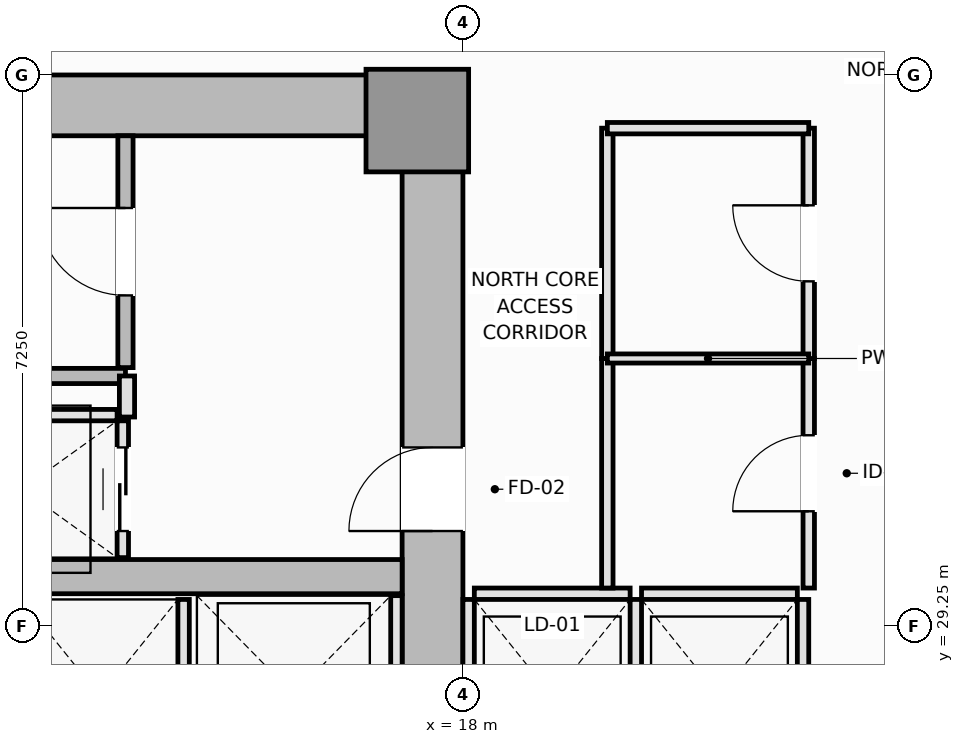
"""IFC4 building model, lengths in metres.
Left out: names, types, materials, properties, quantities, classifications, styles, units other than length and angle.
Written with IfcOpenShell. Run it as: python <this file> out.ifc"""

import sys

from ifc_helpers import new_model, si_unit, direction, frame, frame_2d, origin, origin_2d, place, context, subcontext, project, spatial, rectangle, extrude, element, fill, save


model = new_model("IFC4")
c1 = context("Model", 3, precision=1e-05, world=origin(), true_north=direction((0.0, 1.0)))
c2 = subcontext(c1, "Body", "Model", "MODEL_VIEW")
j1 = project(units=[si_unit("LENGTHUNIT", "METRE"), si_unit("PLANEANGLEUNIT", "RADIAN")], contexts=[c1])
p1 = place(None, origin())
s1 = spatial("IfcSite", under=j1, at=p1, CompositionType="ELEMENT")
p2 = place(p1, origin())
s2 = spatial("IfcBuilding", under=s1, at=p2, CompositionType="ELEMENT")
p3 = place(p2, frame((0.0, 0.0, 25.6)))
s3 = spatial("IfcBuildingStorey", under=s2, at=p3, CompositionType="ELEMENT", Elevation=25.6)
p4 = place(p3, frame((4.5, 36.1, 0.0), z_axis=(0.0, 0.0, 1.0), x_axis=(1.0, 0.0, 0.0)))
e1 = element("IfcWall", 1, at=p4, inside=s3, PredefinedType="SHEAR", context=c2, shape_type="SweptSolid", body=[
    extrude(rectangle(XDim=13.5, YDim=0.8, at=frame_2d((6.75, 0.0))), origin(), (0.0, 0.0, 1.0), 3.55),
])
p5 = place(p3, frame((17.6, 27.05, 0.0), z_axis=(0.0, 0.0, 1.0), x_axis=(0.0, 1.0, 0.0)))
e2 = element("IfcWall", 2, at=p5, inside=s3, PredefinedType="SHEAR", context=c2, shape_type="SweptSolid", body=[
    extrude(rectangle(XDim=8.65, YDim=0.8, at=frame_2d((4.325, 0.0))), origin(), (0.0, 0.0, 1.0), 3.55),
])
p6 = place(p5, frame((3.45, 0.0, 0.0)))
e3 = element("IfcOpeningElement", 3, at=p6, cuts=e2, PredefinedType="OPENING", context=c2, shape_type="SweptSolid", body=[
    extrude(rectangle(XDim=1.1, YDim=2.15, at=frame_2d((0.55, 1.075))), frame((0.0, 0.41, 0.0), z_axis=(0.0, -1.0, 0.0), x_axis=(1.0, 0.0, 0.0)), (0.0, 0.0, 1.0), 0.82),
])
p7 = place(p3, frame((5.3, 29.9, 0.0), z_axis=(0.0, 0.0, 1.0), x_axis=(1.0, 0.0, 0.0)))
e4 = element("IfcWall", 4, at=p7, inside=s3, PredefinedType="SHEAR", context=c2, shape_type="SweptSolid", body=[
    extrude(rectangle(XDim=11.9, YDim=0.45, at=frame_2d((5.95, 0.0))), origin(), (0.0, 0.0, 1.0), 3.55),
])
p8 = place(p3, frame((17.4, 35.9, 0.0), z_axis=(0.0, 0.0, 1.0), x_axis=(1.0, 0.0, 0.0)))
e5 = element("IfcColumn", 5, at=p8, inside=s3, PredefinedType="PILASTER", context=c2, shape_type="SweptSolid", body=[
    extrude(rectangle(XDim=1.35, YDim=1.35, at=origin_2d()), origin(), (0.0, 0.0, 1.0), 3.55),
])
p9 = place(p3, frame((5.9, 32.54, 0.0), z_axis=(0.0, 0.0, 1.0), x_axis=(1.0, 0.0, 0.0)))
e6 = element("IfcWall", 6, at=p9, inside=s3, PredefinedType="SOLIDWALL", context=c2, shape_type="SweptSolid", body=[
    extrude(rectangle(XDim=7.66, YDim=0.2, at=frame_2d((3.83, 0.0))), origin(), (0.0, 0.0, 1.0), 3.55),
])
p10 = place(p3, frame((13.56, 32.65, 0.0), z_axis=(0.0, 0.0, 1.0), x_axis=(0.0, 1.0, 0.0)))
e7 = element("IfcWall", 7, at=p10, inside=s3, PredefinedType="SOLIDWALL", context=c2, shape_type="SweptSolid", body=[
    extrude(rectangle(XDim=3.05, YDim=0.2, at=frame_2d((1.525, 0.0))), origin(), (0.0, 0.0, 1.0), 3.55),
])
p11 = place(p10, frame((0.95, 0.0, 0.0)))
e8 = element("IfcOpeningElement", 8, at=p11, cuts=e7, PredefinedType="OPENING", context=c2, shape_type="SweptSolid", body=[
    extrude(rectangle(XDim=1.15, YDim=2.15, at=frame_2d((0.575, 1.075))), frame((0.0, 0.11, 0.0), z_axis=(0.0, -1.0, 0.0), x_axis=(1.0, 0.0, 0.0)), (0.0, 0.0, 1.0), 0.22),
])
p12 = place(p3, frame((18.15, 29.675, 0.0), z_axis=(0.0, 0.0, 1.0), x_axis=(1.0, 0.0, 0.0)))
e9 = element("IfcWall", 9, at=p12, inside=s3, PredefinedType="PARTITIONING", context=c2, shape_type="SweptSolid", body=[
    extrude(rectangle(XDim=2.05, YDim=0.15, at=frame_2d((1.025, 0.0))), origin(), (0.0, 0.0, 1.0), 3.37),
])
for number, where, z_axis, x_axis in (
    (10, (18.075, 27.05, 0.0), (0.0, 0.0, 1.0), (0.0, 1.0, 0.0)),
    (11, (20.275, 27.05, 0.0), (0.0, 0.0, 1.0), (0.0, 1.0, 0.0)),
):
    element("IfcWall", number, at=place(p3, frame(where, z_axis=z_axis, x_axis=x_axis)), inside=s3, PredefinedType="PARTITIONING", context=c2, shape_type="SweptSolid", body=[
        extrude(rectangle(XDim=2.55, YDim=0.15, at=frame_2d((1.275, 0.0))), origin(), (0.0, 0.0, 1.0), 3.37),
    ])
p13 = place(p3, frame((20.35, 29.675, 0.0), z_axis=(0.0, 0.0, 1.0), x_axis=(1.0, 0.0, 0.0)))
e12 = element("IfcWall", 12, at=p13, inside=s3, PredefinedType="PARTITIONING", context=c2, shape_type="SweptSolid", body=[
    extrude(rectangle(XDim=2.05, YDim=0.15, at=frame_2d((1.025, 0.0))), origin(), (0.0, 0.0, 1.0), 3.37),
])
for number, where, z_axis, x_axis in (
    (13, (22.475, 27.05, 0.0), (0.0, 0.0, 1.0), (0.0, 1.0, 0.0)),
    (14, (14.325, 27.05, 0.0), (0.0, 0.0, 1.0), (0.0, 1.0, 0.0)),
):
    element("IfcWall", number, at=place(p3, frame(where, z_axis=z_axis, x_axis=x_axis)), inside=s3, PredefinedType="PARTITIONING", context=c2, shape_type="SweptSolid", body=[
        extrude(rectangle(XDim=2.55, YDim=0.15, at=frame_2d((1.275, 0.0))), origin(), (0.0, 0.0, 1.0), 3.37),
    ])
p14 = place(p3, frame((17.125, 27.05, 0.0), z_axis=(0.0, 0.0, 1.0), x_axis=(0.0, 1.0, 0.0)))
e15 = element("IfcWall", 15, at=p14, inside=s3, PredefinedType="PARTITIONING", context=c2, shape_type="SweptSolid", body=[
    extrude(rectangle(XDim=2.6, YDim=0.15, at=frame_2d((1.3, 0.0))), origin(), (0.0, 0.0, 1.0), 3.37),
])
p15 = place(p3, frame((10.95, 32.025, 0.0), z_axis=(0.0, 0.0, 1.0), x_axis=(1.0, 0.0, 0.0)))
e16 = element("IfcWall", 16, at=p15, inside=s3, PredefinedType="PARTITIONING", context=c2, shape_type="SweptSolid", body=[
    extrude(rectangle(XDim=2.5, YDim=0.15, at=frame_2d((1.25, 0.0))), origin(), (0.0, 0.0, 1.0), 3.37),
])
p16 = place(p3, frame((13.525, 30.15, 0.0), z_axis=(0.0, 0.0, 1.0), x_axis=(0.0, 1.0, 0.0)))
e17 = element("IfcWall", 17, at=p16, inside=s3, PredefinedType="PARTITIONING", context=c2, shape_type="SweptSolid", body=[
    extrude(rectangle(XDim=1.8, YDim=0.15, at=frame_2d((0.9, 0.0))), origin(), (0.0, 0.0, 1.0), 3.37),
])
p17 = place(p16, frame((0.35, 0.0, 0.0)))
e18 = element("IfcOpeningElement", 18, at=p17, cuts=e17, PredefinedType="OPENING", context=c2, shape_type="SweptSolid", body=[
    extrude(rectangle(XDim=1.1, YDim=2.2, at=frame_2d((0.55, 1.1))), frame((0.0, 0.085, 0.0), z_axis=(0.0, -1.0, 0.0), x_axis=(1.0, 0.0, 0.0)), (0.0, 0.0, 1.0), 0.17),
])
p18 = place(p3, frame((13.58, 32.0, 0.0), z_axis=(0.0, 0.0, 1.0), x_axis=(0.0, 1.0, 0.0)))
e19 = element("IfcWall", 19, at=p18, inside=s3, PredefinedType="PARTITIONING", context=c2, shape_type="SweptSolid", body=[
    extrude(rectangle(XDim=0.54, YDim=0.2, at=frame_2d((0.27, 0.0))), origin(), (0.0, 0.0, 1.0), 3.37),
])
p19 = place(p3, frame((22.55, 29.75, 0.0), z_axis=(0.0, 0.0, 1.0), x_axis=(0.0, 1.0, 0.0)))
e20 = element("IfcWall", 20, at=p19, inside=s3, PredefinedType="PARTITIONING", context=c2, shape_type="SweptSolid", body=[
    extrude(rectangle(XDim=3.02, YDim=0.15, at=frame_2d((1.51, 0.0))), origin(), (0.0, 0.0, 1.0), 3.01),
])
p20 = place(p19, frame((1.01, 0.0, 0.0)))
e21 = element("IfcOpeningElement", 21, at=p20, cuts=e20, PredefinedType="OPENING", context=c2, shape_type="SweptSolid", body=[
    extrude(rectangle(XDim=1.0, YDim=2.15, at=frame_2d((0.5, 1.075))), frame((0.0, 0.085, 0.0), z_axis=(0.0, -1.0, 0.0), x_axis=(1.0, 0.0, 0.0)), (0.0, 0.0, 1.0), 0.17),
])
p21 = place(p3, frame((22.55, 32.77, 0.0), z_axis=(0.0, 0.0, 1.0), x_axis=(0.0, 1.0, 0.0)))
e22 = element("IfcWall", 22, at=p21, inside=s3, PredefinedType="PARTITIONING", context=c2, shape_type="SweptSolid", body=[
    extrude(rectangle(XDim=3.03, YDim=0.15, at=frame_2d((1.515, 0.0))), origin(), (0.0, 0.0, 1.0), 3.01),
])
p22 = place(p21, frame((1.015, 0.0, 0.0)))
e23 = element("IfcOpeningElement", 23, at=p22, cuts=e22, PredefinedType="OPENING", context=c2, shape_type="SweptSolid", body=[
    extrude(rectangle(XDim=1.0, YDim=2.15, at=frame_2d((0.5, 1.075))), frame((0.0, 0.085, 0.0), z_axis=(0.0, -1.0, 0.0), x_axis=(1.0, 0.0, 0.0)), (0.0, 0.0, 1.0), 0.17),
])
p23 = place(p3, frame((19.9, 29.75, 0.0), z_axis=(0.0, 0.0, 1.0), x_axis=(0.0, 1.0, 0.0)))
e24 = element("IfcWall", 24, at=p23, inside=s3, PredefinedType="PARTITIONING", context=c2, shape_type="SweptSolid", body=[
    extrude(rectangle(XDim=3.02, YDim=0.15, at=frame_2d((1.51, 0.0))), origin(), (0.0, 0.0, 1.0), 3.37),
])
p24 = place(p3, frame((19.9, 32.77, 0.0), z_axis=(0.0, 0.0, 1.0), x_axis=(0.0, 1.0, 0.0)))
e25 = element("IfcWall", 25, at=p24, inside=s3, PredefinedType="PARTITIONING", context=c2, shape_type="SweptSolid", body=[
    extrude(rectangle(XDim=3.03, YDim=0.15, at=frame_2d((1.515, 0.0))), origin(), (0.0, 0.0, 1.0), 3.37),
])
p25 = place(p3, frame((19.9, 35.8, 0.0), z_axis=(0.0, 0.0, 1.0), x_axis=(1.0, 0.0, 0.0)))
e26 = element("IfcWall", 26, at=p25, inside=s3, PredefinedType="PARTITIONING", context=c2, shape_type="SweptSolid", body=[
    extrude(rectangle(XDim=2.65, YDim=0.15, at=frame_2d((1.325, 0.0))), origin(), (0.0, 0.0, 1.0), 3.37),
])
p26 = place(p3, frame((19.9, 32.77, 0.0), z_axis=(0.0, 0.0, 1.0), x_axis=(1.0, 0.0, 0.0)))
e27 = element("IfcWall", 27, at=p26, inside=s3, PredefinedType="PARTITIONING", context=c2, shape_type="SweptSolid", body=[
    extrude(rectangle(XDim=2.65, YDim=0.12, at=frame_2d((1.325, 0.0))), origin(), (0.0, 0.0, 1.0), 3.37),
])
p27 = place(p11, origin())
e28 = element("IfcDoor", 28, at=p27, inside=s3, OperationType="SINGLE_SWING_RIGHT", PredefinedType="DOOR", context=c2, shape_type="SweptSolid", body=[
    extrude(rectangle(XDim=1.15, YDim=2.15, at=frame_2d((0.575, 1.075))), frame((0.0, 0.025, 0.0), z_axis=(0.0, -1.0, 0.0), x_axis=(1.0, 0.0, 0.0)), (0.0, 0.0, 1.0), 0.05),
])
fill(e8, e28)
p28 = place(p17, origin())
e29 = element("IfcDoor", 29, at=p28, inside=s3, OperationType="DOUBLE_DOOR_SLIDING", PredefinedType="DOOR", context=c2, shape_type="SweptSolid", body=[
    extrude(rectangle(XDim=1.1, YDim=2.2, at=frame_2d((0.55, 1.1))), frame((0.0, 0.025, 0.0), z_axis=(0.0, -1.0, 0.0), x_axis=(1.0, 0.0, 0.0)), (0.0, 0.0, 1.0), 0.05),
])
fill(e18, e29)
p29 = place(p6, origin())
e30 = element("IfcDoor", 30, at=p29, inside=s3, OperationType="SINGLE_SWING_LEFT", PredefinedType="DOOR", context=c2, shape_type="SweptSolid", body=[
    extrude(rectangle(XDim=1.1, YDim=2.15, at=frame_2d((0.55, 1.075))), frame((0.0, 0.025, 0.0), z_axis=(0.0, -1.0, 0.0), x_axis=(1.0, 0.0, 0.0)), (0.0, 0.0, 1.0), 0.05),
])
fill(e3, e30)
p30 = place(p20, origin())
e31 = element("IfcDoor", 31, at=p30, inside=s3, OperationType="SINGLE_SWING_LEFT", PredefinedType="DOOR", context=c2, shape_type="SweptSolid", body=[
    extrude(rectangle(XDim=1.0, YDim=2.15, at=frame_2d((0.5, 1.075))), frame((0.0, 0.025, 0.0), z_axis=(0.0, -1.0, 0.0), x_axis=(1.0, 0.0, 0.0)), (0.0, 0.0, 1.0), 0.05),
])
fill(e21, e31)
p31 = place(p22, origin())
e32 = element("IfcDoor", 32, at=p31, inside=s3, OperationType="SINGLE_SWING_RIGHT", PredefinedType="DOOR", context=c2, shape_type="SweptSolid", body=[
    extrude(rectangle(XDim=1.0, YDim=2.15, at=frame_2d((0.5, 1.075))), frame((0.0, 0.025, 0.0), z_axis=(0.0, -1.0, 0.0), x_axis=(1.0, 0.0, 0.0)), (0.0, 0.0, 1.0), 0.05),
])
fill(e23, e32)
save(model, sys.argv[1])
